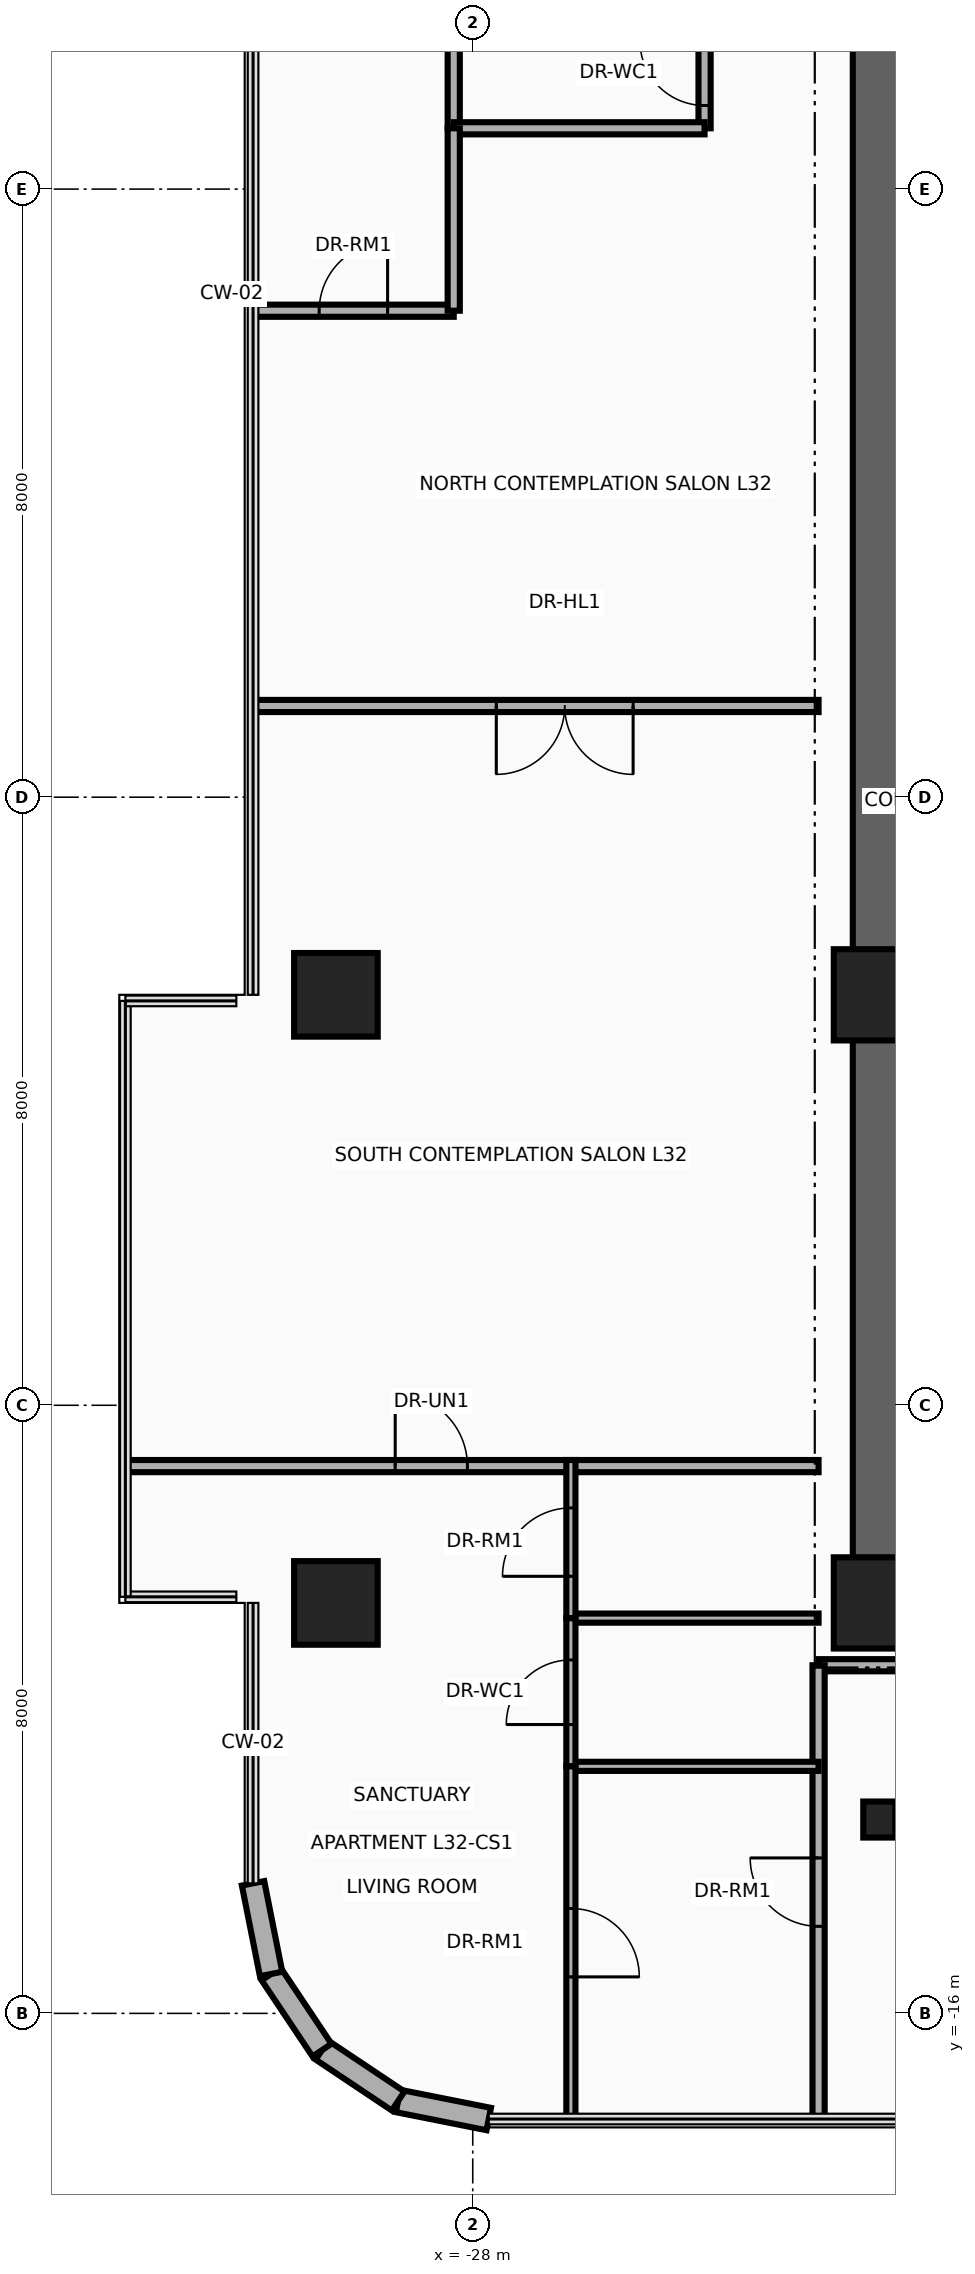
"""IFC4 building model, lengths in metres.
Left out: names, types, materials, properties, quantities, classifications, styles, units other than length and angle.
Written with IfcOpenShell. Run it as: python <this file> out.ifc"""

import sys

from ifc_helpers import new_model, si_unit, direction, frame, frame_2d, origin, origin_2d, place, context, subcontext, project, spatial, rectangle, circle, i_section, extrude, source, transform, mapped, element, fill, save


model = new_model("IFC4")
c1 = context("Model", 3, precision=1e-05, world=origin(), true_north=direction((0.0, 1.0)))
c2 = subcontext(c1, "Body", "Model", "MODEL_VIEW")
j1 = project(units=[si_unit("LENGTHUNIT", "METRE"), si_unit("PLANEANGLEUNIT", "RADIAN")], contexts=[c1])
p1 = place(None, origin())
s1 = spatial("IfcSite", under=j1, at=p1, CompositionType="ELEMENT")
p2 = place(p1, origin())
s2 = spatial("IfcBuilding", under=s1, at=p2, CompositionType="ELEMENT")
p3 = place(p2, frame((0.0, 0.0, 127.9)))
s3 = spatial("IfcBuildingStorey", under=s2, at=p3, CompositionType="ELEMENT", Elevation=127.9)
p4 = place(p3, frame((-22.65, -11.15, 0.0), z_axis=(0.0, 0.0, 1.0), x_axis=(0.0, 1.0, 0.0)))
e1 = element("IfcWall", 1, at=p4, inside=s3, PredefinedType="SHEAR", context=c2, shape_type="SweptSolid", body=[
    extrude(rectangle(XDim=22.3, YDim=0.7, at=frame_2d((11.15, 0.0))), origin(), (0.0, 0.0, 1.0), 3.46),
])
p5 = place(p3, frame((-22.65, -10.8, 0.0), z_axis=(0.0, 0.0, 1.0), x_axis=(1.0, 0.0, 0.0)))
e2 = element("IfcWall", 2, at=p5, inside=s3, PredefinedType="SHEAR", context=c2, shape_type="SweptSolid", body=[
    extrude(rectangle(XDim=10.25, YDim=0.7, at=frame_2d((5.125, 0.0))), origin(), (0.0, 0.0, 1.0), 3.46),
])
m1 = source(origin(), c2, "Body", "SweptSolid", [
    extrude(circle(Radius=0.55, at=origin_2d()), origin(), (0.0, 0.0, 1.0), 3.7),
])
p6 = place(p3, frame((-29.8, -10.6, 0.0), z_axis=(0.0, 0.0, 1.0), x_axis=(1.0, 0.0, 0.0)))
e3 = element("IfcColumn", 3, at=p6, inside=s3, PredefinedType="COLUMN", context=c2, shape_type="MappedRepresentation", body=[
    mapped(m1, transform((0.0, 0.0, 0.0), x_axis=(1.0, 0.0, 0.0), y_axis=(0.0, 1.0, 0.0), z_axis=(0.0, 0.0, 1.0), scale=1.0)),
])
m2 = source(origin(), c2, "Body", "SweptSolid", [
    extrude(rectangle(XDim=1.2, YDim=1.2, at=origin_2d()), origin(), (0.0, 0.0, 1.0), 3.7),
])
p7 = place(p3, frame((-22.65, -10.6, 0.0), z_axis=(0.0, 0.0, 1.0), x_axis=(1.0, 0.0, 0.0)))
e4 = element("IfcColumn", 4, at=p7, inside=s3, PredefinedType="COLUMN", context=c2, shape_type="MappedRepresentation", body=[
    mapped(m2, transform((0.0, 0.0, 0.0), x_axis=(1.0, 0.0, 0.0), y_axis=(0.0, 1.0, 0.0), z_axis=(0.0, 0.0, 1.0), scale=1.0)),
])
p8 = place(p3, frame((-29.8, -2.6, 0.0), z_axis=(0.0, 0.0, 1.0), x_axis=(1.0, 0.0, 0.0)))
e5 = element("IfcColumn", 5, at=p8, inside=s3, PredefinedType="COLUMN", context=c2, shape_type="MappedRepresentation", body=[
    mapped(m1, transform((0.0, 0.0, 0.0), x_axis=(1.0, 0.0, 0.0), y_axis=(0.0, 1.0, 0.0), z_axis=(0.0, 0.0, 1.0), scale=1.0)),
])
p9 = place(p3, frame((-22.65, -2.6, 0.0), z_axis=(0.0, 0.0, 1.0), x_axis=(1.0, 0.0, 0.0)))
e6 = element("IfcColumn", 6, at=p9, inside=s3, PredefinedType="COLUMN", context=c2, shape_type="MappedRepresentation", body=[
    mapped(m2, transform((0.0, 0.0, 0.0), x_axis=(1.0, 0.0, 0.0), y_axis=(0.0, 1.0, 0.0), z_axis=(0.0, 0.0, 1.0), scale=1.0)),
])
m3 = source(origin(), c2, "Body", "SweptSolid", [
    extrude(i_section(OverallWidth=0.424, OverallDepth=0.474, WebThickness=0.048, FlangeThickness=0.077, at=origin_2d()), origin(), (0.0, 0.0, 1.0), 3.7),
])
p10 = place(p3, frame((-22.65, -13.45, 0.0), z_axis=(0.0, 0.0, 1.0), x_axis=(1.0, 0.0, 0.0)))
e7 = element("IfcColumn", 7, at=p10, inside=s3, PredefinedType="COLUMN", context=c2, shape_type="MappedRepresentation", body=[
    mapped(m3, transform((0.0, 0.0, 0.0), x_axis=(1.0, 0.0, 0.0), y_axis=(0.0, 1.0, 0.0), z_axis=(0.0, 0.0, 1.0), scale=1.0)),
])
p11 = place(p3, frame((-27.789, -17.39, 0.0), z_axis=(0.0, 0.0, 1.0), x_axis=(-0.980804027463, 0.194996050505, 0.0)))
e8 = element("IfcWall", 8, at=p11, inside=s3, PredefinedType="SOLIDWALL", context=c2, shape_type="SweptSolid", body=[
    extrude(rectangle(XDim=1.216, YDim=0.3, at=frame_2d((0.608, 0.0))), origin(), (0.0, 0.0, 1.0), 3.46),
])
for number, where, z_axis, x_axis in (
    (9, (-28.982, -17.153, 0.0), (0.0, 0.0, 1.0), (-0.831, 0.556, 0.0)),
    (10, (-29.983, -16.483, 0.0), (0.0, 0.0, 1.0), (-0.556, 0.831, 0.0)),
):
    element("IfcWall", number, at=place(p3, frame(where, z_axis=z_axis, x_axis=x_axis)), inside=s3, PredefinedType="SOLIDWALL", context=c2, shape_type="SweptSolid", body=[
        extrude(rectangle(XDim=1.205, YDim=0.3, at=frame_2d((0.603, 0.0))), origin(), (0.0, 0.0, 1.0), 3.46),
    ])
p12 = place(p3, frame((-30.653, -15.482, 0.0), z_axis=(0.0, 0.0, 1.0), x_axis=(-0.194996050505, 0.980804027463, 0.0)))
e11 = element("IfcWall", 11, at=p12, inside=s3, PredefinedType="SOLIDWALL", context=c2, shape_type="SweptSolid", body=[
    extrude(rectangle(XDim=1.216, YDim=0.3, at=frame_2d((0.608, 0.0))), origin(), (0.0, 0.0, 1.0), 3.46),
])
p13 = place(p3, frame((-28.25, 8.8, 0.0), z_axis=(0.0, 0.0, 1.0), x_axis=(0.0, 1.0, 0.0)))
e12 = element("IfcWall", 12, at=p13, inside=s3, PredefinedType="PARTITIONING", context=c2, shape_type="SweptSolid", body=[
    extrude(rectangle(XDim=2.6, YDim=0.16, at=frame_2d((1.3, 0.0))), origin(), (0.0, 0.0, 1.0), 2.666),
])
p14 = place(p3, frame((-24.95, 8.8, 0.0), z_axis=(0.0, 0.0, 1.0), x_axis=(0.0, 1.0, 0.0)))
e13 = element("IfcWall", 13, at=p14, inside=s3, PredefinedType="PARTITIONING", context=c2, shape_type="SweptSolid", body=[
    extrude(rectangle(XDim=2.6, YDim=0.16, at=frame_2d((1.3, 0.0))), origin(), (0.0, 0.0, 1.0), 2.666),
])
p15 = place(p14, frame((0.3, 0.0, 0.0)))
e14 = element("IfcOpeningElement", 14, at=p15, cuts=e13, PredefinedType="OPENING", context=c2, shape_type="SweptSolid", body=[
    extrude(rectangle(XDim=0.85, YDim=2.1, at=frame_2d((0.425, 1.05))), frame((0.0, 0.095, 0.0), z_axis=(0.0, -1.0, 0.0), x_axis=(1.0, 0.0, 0.0)), (0.0, 0.0, 1.0), 0.19),
])
p16 = place(p14, frame((1.45, 0.0, 0.0)))
e15 = element("IfcOpeningElement", 15, at=p16, cuts=e13, PredefinedType="OPENING", context=c2, shape_type="SweptSolid", body=[
    extrude(rectangle(XDim=0.85, YDim=2.1, at=frame_2d((0.425, 1.05))), frame((0.0, 0.095, 0.0), z_axis=(0.0, -1.0, 0.0), x_axis=(1.0, 0.0, 0.0)), (0.0, 0.0, 1.0), 0.19),
])
p17 = place(p3, frame((-28.25, 8.8, 0.0), z_axis=(0.0, 0.0, 1.0), x_axis=(1.0, 0.0, 0.0)))
e16 = element("IfcWall", 16, at=p17, inside=s3, PredefinedType="PARTITIONING", context=c2, shape_type="SweptSolid", body=[
    extrude(rectangle(XDim=3.3, YDim=0.16, at=frame_2d((1.65, 0.0))), origin(), (0.0, 0.0, 1.0), 3.46),
])
p18 = place(p3, frame((-23.45, -11.42, 0.0), z_axis=(0.0, 0.0, 1.0), x_axis=(1.0, 0.0, 0.0)))
e17 = element("IfcWall", 17, at=p18, inside=s3, PredefinedType="PARTITIONING", context=c2, shape_type="SweptSolid", body=[
    extrude(rectangle(XDim=13.84, YDim=0.16, at=frame_2d((6.92, 0.0))), origin(), (0.0, 0.0, 1.0), 2.834),
])
p19 = place(p3, frame((-23.45, -17.39, 0.0), z_axis=(0.0, 0.0, 1.0), x_axis=(0.0, 1.0, 0.0)))
e18 = element("IfcWall", 18, at=p19, inside=s3, PredefinedType="PARTITIONING", context=c2, shape_type="SweptSolid", body=[
    extrude(rectangle(XDim=5.97, YDim=0.16, at=frame_2d((2.985, 0.0))), origin(), (0.0, 0.0, 1.0), 3.46),
])
p20 = place(p19, frame((2.535, 0.0, 0.0)))
e19 = element("IfcOpeningElement", 19, at=p20, cuts=e18, PredefinedType="OPENING", context=c2, shape_type="SweptSolid", body=[
    extrude(rectangle(XDim=0.9, YDim=2.1, at=frame_2d((0.45, 1.05))), frame((0.0, 0.095, 0.0), z_axis=(0.0, -1.0, 0.0), x_axis=(1.0, 0.0, 0.0)), (0.0, 0.0, 1.0), 0.19),
])
p21 = place(p3, frame((-32.54, -8.8, 0.0), z_axis=(0.0, 0.0, 1.0), x_axis=(1.0, 0.0, 0.0)))
e20 = element("IfcWall", 20, at=p21, inside=s3, PredefinedType="PARTITIONING", context=c2, shape_type="SweptSolid", body=[
    extrude(rectangle(XDim=9.09, YDim=0.16, at=frame_2d((4.545, 0.0))), origin(), (0.0, 0.0, 1.0), 2.896),
])
p22 = place(p21, frame((3.52, 0.0, 0.0)))
e21 = element("IfcOpeningElement", 21, at=p22, cuts=e20, PredefinedType="OPENING", context=c2, shape_type="SweptSolid", body=[
    extrude(rectangle(XDim=0.95, YDim=2.15, at=frame_2d((0.475, 1.075))), frame((0.0, 0.095, 0.0), z_axis=(0.0, -1.0, 0.0), x_axis=(1.0, 0.0, 0.0)), (0.0, 0.0, 1.0), 0.19),
])
p23 = place(p3, frame((-30.89, 6.4, 0.0), z_axis=(0.0, 0.0, 1.0), x_axis=(1.0, 0.0, 0.0)))
e22 = element("IfcWall", 22, at=p23, inside=s3, PredefinedType="PARTITIONING", context=c2, shape_type="SweptSolid", body=[
    extrude(rectangle(XDim=2.64, YDim=0.16, at=frame_2d((1.32, 0.0))), origin(), (0.0, 0.0, 1.0), 2.896),
])
p24 = place(p23, frame((0.87, 0.0, 0.0)))
e23 = element("IfcOpeningElement", 23, at=p24, cuts=e22, PredefinedType="OPENING", context=c2, shape_type="SweptSolid", body=[
    extrude(rectangle(XDim=0.9, YDim=2.1, at=frame_2d((0.45, 1.05))), frame((0.0, 0.095, 0.0), z_axis=(0.0, -1.0, 0.0), x_axis=(1.0, 0.0, 0.0)), (0.0, 0.0, 1.0), 0.19),
])
p25 = place(p3, frame((-28.25, 6.4, 0.0), z_axis=(0.0, 0.0, 1.0), x_axis=(0.0, 1.0, 0.0)))
e24 = element("IfcWall", 24, at=p25, inside=s3, PredefinedType="PARTITIONING", context=c2, shape_type="SweptSolid", body=[
    extrude(rectangle(XDim=2.4, YDim=0.16, at=frame_2d((1.2, 0.0))), origin(), (0.0, 0.0, 1.0), 2.988),
])
p26 = place(p3, frame((-26.708, -10.8, 0.0), z_axis=(0.0, 0.0, 1.0), x_axis=(1.0, 0.0, 0.0)))
e25 = element("IfcWall", 25, at=p26, inside=s3, PredefinedType="PARTITIONING", context=c2, shape_type="SweptSolid", body=[
    extrude(rectangle(XDim=3.259, YDim=0.12, at=frame_2d((1.629, 0.0))), origin(), (0.0, 0.0, 1.0), 2.666),
])
p27 = place(p3, frame((-26.708, -12.75, 0.0), z_axis=(0.0, 0.0, 1.0), x_axis=(1.0, 0.0, 0.0)))
e26 = element("IfcWall", 26, at=p27, inside=s3, PredefinedType="PARTITIONING", context=c2, shape_type="SweptSolid", body=[
    extrude(rectangle(XDim=3.259, YDim=0.12, at=frame_2d((1.629, 0.0))), origin(), (0.0, 0.0, 1.0), 3.46),
])
p28 = place(p3, frame((-26.708, -12.75, 0.0), z_axis=(0.0, 0.0, 1.0), x_axis=(0.0, 1.0, 0.0)))
e27 = element("IfcWall", 27, at=p28, inside=s3, PredefinedType="PARTITIONING", context=c2, shape_type="SweptSolid", body=[
    extrude(rectangle(XDim=1.95, YDim=0.12, at=frame_2d((0.975, 0.0))), origin(), (0.0, 0.0, 1.0), 2.666),
])
p29 = place(p28, frame((0.55, 0.0, 0.0)))
e28 = element("IfcOpeningElement", 28, at=p29, cuts=e27, PredefinedType="OPENING", context=c2, shape_type="SweptSolid", body=[
    extrude(rectangle(XDim=0.85, YDim=2.1, at=frame_2d((0.425, 1.05))), frame((0.0, 0.075, 0.0), z_axis=(0.0, -1.0, 0.0), x_axis=(1.0, 0.0, 0.0)), (0.0, 0.0, 1.0), 0.15),
])
p30 = place(p3, frame((-26.708, -10.8, 0.0), z_axis=(0.0, 0.0, 1.0), x_axis=(0.0, 1.0, 0.0)))
e29 = element("IfcWall", 29, at=p30, inside=s3, PredefinedType="PARTITIONING", context=c2, shape_type="SweptSolid", body=[
    extrude(rectangle(XDim=2.08, YDim=0.12, at=frame_2d((1.04, 0.0))), origin(), (0.0, 0.0, 1.0), 2.666),
])
p31 = place(p30, frame((0.55, 0.0, 0.0)))
e30 = element("IfcOpeningElement", 30, at=p31, cuts=e29, PredefinedType="OPENING", context=c2, shape_type="SweptSolid", body=[
    extrude(rectangle(XDim=0.9, YDim=2.1, at=frame_2d((0.45, 1.05))), frame((0.0, 0.075, 0.0), z_axis=(0.0, -1.0, 0.0), x_axis=(1.0, 0.0, 0.0)), (0.0, 0.0, 1.0), 0.15),
])
p32 = place(p3, frame((-26.708, -17.39, 0.0), z_axis=(0.0, 0.0, 1.0), x_axis=(0.0, 1.0, 0.0)))
e31 = element("IfcWall", 31, at=p32, inside=s3, PredefinedType="PARTITIONING", context=c2, shape_type="SweptSolid", body=[
    extrude(rectangle(XDim=4.64, YDim=0.12, at=frame_2d((2.32, 0.0))), origin(), (0.0, 0.0, 1.0), 3.46),
])
p33 = place(p32, frame((1.87, 0.0, 0.0)))
e32 = element("IfcOpeningElement", 32, at=p33, cuts=e31, PredefinedType="OPENING", context=c2, shape_type="SweptSolid", body=[
    extrude(rectangle(XDim=0.9, YDim=2.1, at=frame_2d((0.45, 1.05))), frame((0.0, 0.075, 0.0), z_axis=(0.0, -1.0, 0.0), x_axis=(1.0, 0.0, 0.0)), (0.0, 0.0, 1.0), 0.15),
])
p34 = place(p3, frame((-30.89, 1.2, 0.0), z_axis=(0.0, 0.0, 1.0), x_axis=(1.0, 0.0, 0.0)))
e33 = element("IfcWall", 33, at=p34, inside=s3, PredefinedType="PARTITIONING", context=c2, shape_type="SweptSolid", body=[
    extrude(rectangle(XDim=7.44, YDim=0.16, at=frame_2d((3.72, 0.0))), origin(), (0.0, 0.0, 1.0), 2.896),
])
p35 = place(p34, frame((3.2, 0.0, 0.0)))
e34 = element("IfcOpeningElement", 34, at=p35, cuts=e33, PredefinedType="OPENING", context=c2, shape_type="SweptSolid", body=[
    extrude(rectangle(XDim=1.8, YDim=2.15, at=frame_2d((0.9, 1.075))), frame((0.0, 0.095, 0.0), z_axis=(0.0, -1.0, 0.0), x_axis=(1.0, 0.0, 0.0)), (0.0, 0.0, 1.0), 0.19),
])
p36 = place(p15, origin())
e35 = element("IfcDoor", 35, at=p36, inside=s3, OperationType="SINGLE_SWING_RIGHT", PredefinedType="DOOR", context=c2, shape_type="SweptSolid", body=[
    extrude(rectangle(XDim=0.85, YDim=2.1, at=frame_2d((0.425, 1.05))), frame((0.0, 0.025, 0.0), z_axis=(0.0, -1.0, 0.0), x_axis=(1.0, 0.0, 0.0)), (0.0, 0.0, 1.0), 0.05),
])
fill(e14, e35)
p37 = place(p22, origin())
e36 = element("IfcDoor", 36, at=p37, inside=s3, OperationType="SINGLE_SWING_RIGHT", PredefinedType="DOOR", context=c2, shape_type="SweptSolid", body=[
    extrude(rectangle(XDim=0.95, YDim=2.15, at=frame_2d((0.475, 1.075))), frame((0.0, 0.025, 0.0), z_axis=(0.0, -1.0, 0.0), x_axis=(1.0, 0.0, 0.0)), (0.0, 0.0, 1.0), 0.05),
])
fill(e21, e36)
p38 = place(p29, origin())
e37 = element("IfcDoor", 37, at=p38, inside=s3, OperationType="SINGLE_SWING_LEFT", PredefinedType="DOOR", context=c2, shape_type="SweptSolid", body=[
    extrude(rectangle(XDim=0.85, YDim=2.1, at=frame_2d((0.425, 1.05))), frame((0.0, 0.025, 0.0), z_axis=(0.0, -1.0, 0.0), x_axis=(1.0, 0.0, 0.0)), (0.0, 0.0, 1.0), 0.05),
])
fill(e28, e37)
p39 = place(p31, origin())
e38 = element("IfcDoor", 38, at=p39, inside=s3, OperationType="SINGLE_SWING_RIGHT", PredefinedType="DOOR", context=c2, shape_type="SweptSolid", body=[
    extrude(rectangle(XDim=0.9, YDim=2.1, at=frame_2d((0.45, 1.05))), frame((0.0, 0.025, 0.0), z_axis=(0.0, -1.0, 0.0), x_axis=(1.0, 0.0, 0.0)), (0.0, 0.0, 1.0), 0.05),
])
fill(e30, e38)
p40 = place(p33, frame((0.9, 0.0, 0.0), z_axis=(0.0, 0.0, 1.0), x_axis=(-1.0, 0.0, 0.0)))
e39 = element("IfcDoor", 39, at=p40, inside=s3, OperationType="SINGLE_SWING_LEFT", PredefinedType="DOOR", context=c2, shape_type="SweptSolid", body=[
    extrude(rectangle(XDim=0.9, YDim=2.1, at=frame_2d((0.45, 1.05))), frame((0.0, 0.025, 0.0), z_axis=(0.0, -1.0, 0.0), x_axis=(1.0, 0.0, 0.0)), (0.0, 0.0, 1.0), 0.05),
])
fill(e32, e39)
p41 = place(p24, origin())
e40 = element("IfcDoor", 40, at=p41, inside=s3, OperationType="SINGLE_SWING_RIGHT", PredefinedType="DOOR", context=c2, shape_type="SweptSolid", body=[
    extrude(rectangle(XDim=0.9, YDim=2.1, at=frame_2d((0.45, 1.05))), frame((0.0, 0.025, 0.0), z_axis=(0.0, -1.0, 0.0), x_axis=(1.0, 0.0, 0.0)), (0.0, 0.0, 1.0), 0.05),
])
fill(e23, e40)
p42 = place(p35, frame((1.8, 0.0, 0.0), z_axis=(0.0, 0.0, 1.0), x_axis=(-1.0, 0.0, 0.0)))
e41 = element("IfcDoor", 41, at=p42, inside=s3, OperationType="DOUBLE_DOOR_SINGLE_SWING", PredefinedType="DOOR", context=c2, shape_type="SweptSolid", body=[
    extrude(rectangle(XDim=1.8, YDim=2.15, at=frame_2d((0.9, 1.075))), frame((0.0, 0.025, 0.0), z_axis=(0.0, -1.0, 0.0), x_axis=(1.0, 0.0, 0.0)), (0.0, 0.0, 1.0), 0.05),
])
fill(e34, e41)
p43 = place(p20, origin())
e42 = element("IfcDoor", 42, at=p43, inside=s3, OperationType="SINGLE_SWING_RIGHT", PredefinedType="DOOR", context=c2, shape_type="SweptSolid", body=[
    extrude(rectangle(XDim=0.9, YDim=2.1, at=frame_2d((0.45, 1.05))), frame((0.0, 0.025, 0.0), z_axis=(0.0, -1.0, 0.0), x_axis=(1.0, 0.0, 0.0)), (0.0, 0.0, 1.0), 0.05),
])
fill(e19, e42)
save(model, sys.argv[1])
